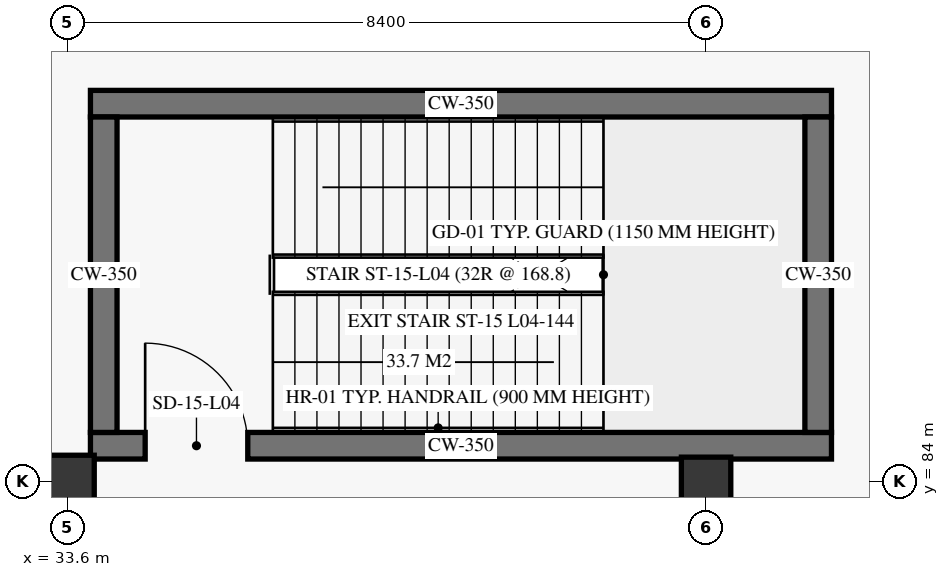
"""IFC4 building model, lengths in metres.
Left out: names, types, materials, properties, quantities, classifications, styles, units other than length and angle.
Written with IfcOpenShell. Run it as: python <this file> out.ifc"""

import sys

from ifc_helpers import new_model, si_unit, direction, frame, frame_2d, origin, origin_2d, place, context, subcontext, project, spatial, rectangle, extrude, element, fill, save


model = new_model("IFC4")
c1 = context("Model", 3, precision=1e-05, world=origin(), true_north=direction((0.0, 1.0)))
c2 = subcontext(c1, "Body", "Model", "MODEL_VIEW")
j1 = project(units=[si_unit("LENGTHUNIT", "METRE"), si_unit("PLANEANGLEUNIT", "RADIAN")], contexts=[c1])
p1 = place(None, origin())
s1 = spatial("IfcSite", under=j1, at=p1, CompositionType="ELEMENT")
p2 = place(p1, origin())
s2 = spatial("IfcBuilding", under=s1, at=p2, CompositionType="ELEMENT")
p3 = place(p2, frame((0.0, 0.0, 16.8)))
s3 = spatial("IfcBuildingStorey", under=s2, at=p3, CompositionType="ELEMENT", Elevation=16.8)
p4 = place(p3, frame((33.6, 84.0, 0.0), z_axis=(0.0, 0.0, 1.0), x_axis=(1.0, 0.0, 0.0)))
e1 = element("IfcColumn", 1, at=p4, inside=s3, PredefinedType="COLUMN", context=c2, shape_type="SweptSolid", body=[
    extrude(rectangle(XDim=0.7, YDim=0.7, at=origin_2d()), origin(), (0.0, 0.0, 1.0), 5.1),
])
p5 = place(p3, frame((42.0, 84.0, 0.0), z_axis=(0.0, 0.0, 1.0), x_axis=(1.0, 0.0, 0.0)))
e2 = element("IfcColumn", 2, at=p5, inside=s3, PredefinedType="COLUMN", context=c2, shape_type="SweptSolid", body=[
    extrude(rectangle(XDim=0.65, YDim=0.65, at=origin_2d()), origin(), (0.0, 0.0, 1.0), 5.1),
])
p6 = place(p3, frame((33.9, 84.475, 0.0), z_axis=(0.0, 0.0, 1.0), x_axis=(1.0, 0.0, 0.0)))
e3 = element("IfcWall", 3, at=p6, inside=s3, PredefinedType="SHEAR", context=c2, shape_type="SweptSolid", body=[
    extrude(rectangle(XDim=9.75, YDim=0.35, at=frame_2d((4.875, 0.0))), origin(), (0.0, 0.0, 1.0), 5.1),
])
p7 = place(p6, frame((0.72, 0.0, 0.0)))
e4 = element("IfcOpeningElement", 4, at=p7, cuts=e3, PredefinedType="OPENING", context=c2, shape_type="SweptSolid", body=[
    extrude(rectangle(XDim=1.35, YDim=2.25, at=frame_2d((0.675, 1.125))), frame((0.0, 0.185, 0.0), z_axis=(0.0, -1.0, 0.0), x_axis=(1.0, 0.0, 0.0)), (0.0, 0.0, 1.0), 0.37),
])
p8 = place(p3, frame((33.9, 88.975, 0.0), z_axis=(0.0, 0.0, 1.0), x_axis=(1.0, 0.0, 0.0)))
e5 = element("IfcWall", 5, at=p8, inside=s3, PredefinedType="SHEAR", context=c2, shape_type="SweptSolid", body=[
    extrude(rectangle(XDim=9.75, YDim=0.35, at=frame_2d((4.875, 0.0))), origin(), (0.0, 0.0, 1.0), 5.1),
])
for number, where, z_axis, x_axis in (
    (6, (34.075, 84.65, 0.0), (0.0, 0.0, 1.0), (0.0, 1.0, 0.0)),
    (7, (43.475, 84.65, 0.0), (0.0, 0.0, 1.0), (0.0, 1.0, 0.0)),
):
    element("IfcWall", number, at=place(p3, frame(where, z_axis=z_axis, x_axis=x_axis)), inside=s3, PredefinedType="SHEAR", context=c2, shape_type="SweptSolid", body=[
        extrude(rectangle(XDim=4.15, YDim=0.35, at=frame_2d((2.075, 0.0))), origin(), (0.0, 0.0, 1.0), 5.1),
    ])
p9 = place(p7, origin())
e8 = element("IfcDoor", 8, at=p9, inside=s3, OperationType="SINGLE_SWING_LEFT", PredefinedType="DOOR", context=c2, shape_type="SweptSolid", body=[
    extrude(rectangle(XDim=1.35, YDim=2.25, at=frame_2d((0.675, 1.125))), frame((0.0, 0.025, 0.0), z_axis=(0.0, -1.0, 0.0), x_axis=(1.0, 0.0, 0.0)), (0.0, 0.0, 1.0), 0.05),
])
fill(e4, e8)
save(model, sys.argv[1])
